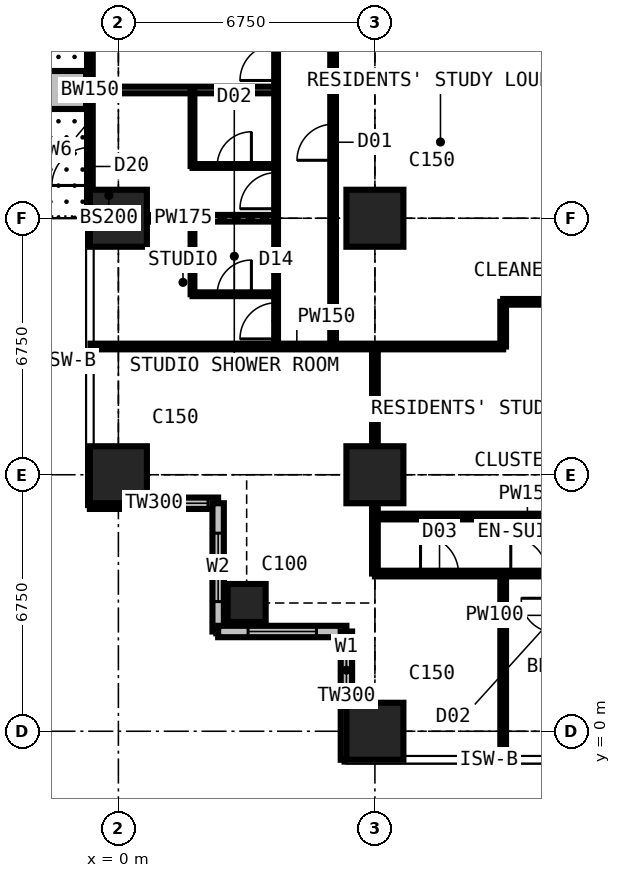
"""IFC4 building model, lengths in metres.
Left out: names, types, materials, properties, quantities, classifications, styles, units other than length and angle.
Written with IfcOpenShell. Run it as: python <this file> out.ifc"""

import sys

from ifc_helpers import new_model, si_unit, direction, frame, frame_2d, origin, origin_2d, place, context, subcontext, project, spatial, rectangle, extrude, element, fill, save


model = new_model("IFC4")
c1 = context("Model", 3, precision=1e-05, world=origin(), true_north=direction((0.0, 1.0)))
c2 = subcontext(c1, "Body", "Model", "MODEL_VIEW")
j1 = project(units=[si_unit("LENGTHUNIT", "METRE"), si_unit("PLANEANGLEUNIT", "RADIAN")], contexts=[c1])
p1 = place(None, origin())
s1 = spatial("IfcSite", under=j1, at=p1, CompositionType="ELEMENT")
p2 = place(p1, origin())
s2 = spatial("IfcBuilding", under=s1, at=p2, CompositionType="ELEMENT")
p3 = place(p2, frame((0.0, 0.0, 130.5)))
s3 = spatial("IfcBuildingStorey", under=s2, at=p3, CompositionType="ELEMENT", Elevation=130.5)
for number, where, z_axis, x_axis in (
    (1, (0.0, 6.75, 0.0), (0.0, 0.0, 1.0), (1.0, 0.0, 0.0)),
    (2, (0.0, 13.5, 0.0), (0.0, 0.0, 1.0), (1.0, 0.0, 0.0)),
):
    element("IfcColumn", number, at=place(p3, frame(where, z_axis=z_axis, x_axis=x_axis)), inside=s3, PredefinedType="COLUMN", context=c2, shape_type="SweptSolid", body=[
        extrude(rectangle(XDim=1.5, YDim=1.5, at=origin_2d()), origin(), (0.0, 0.0, 1.0), 3.6),
    ])
p4 = place(p3, frame((3.375, 3.375, 0.0), z_axis=(0.0, 0.0, 1.0), x_axis=(1.0, 0.0, 0.0)))
e3 = element("IfcColumn", 3, at=p4, inside=s3, PredefinedType="COLUMN", context=c2, shape_type="SweptSolid", body=[
    extrude(rectangle(XDim=1.0, YDim=1.0, at=origin_2d()), origin(), (0.0, 0.0, 1.0), 3.6),
])
for number, where, z_axis, x_axis in (
    (4, (6.75, 0.0, 0.0), (0.0, 0.0, 1.0), (1.0, 0.0, 0.0)),
    (5, (6.75, 6.75, 0.0), (0.0, 0.0, 1.0), (1.0, 0.0, 0.0)),
    (6, (6.75, 13.5, 0.0), (0.0, 0.0, 1.0), (1.0, 0.0, 0.0)),
):
    element("IfcColumn", number, at=place(p3, frame(where, z_axis=z_axis, x_axis=x_axis)), inside=s3, PredefinedType="COLUMN", context=c2, shape_type="SweptSolid", body=[
        extrude(rectangle(XDim=1.5, YDim=1.5, at=origin_2d()), origin(), (0.0, 0.0, 1.0), 3.6),
    ])
p5 = place(p3, frame((-0.75, 13.5, 0.0), z_axis=(0.0, 0.0, 1.0), x_axis=(0.0, 1.0, 0.0)))
e7 = element("IfcWall", 7, at=p5, inside=s3, PredefinedType="SOLIDWALL", context=c2, shape_type="SweptSolid", body=[
    extrude(rectangle(XDim=6.75, YDim=0.15, at=frame_2d((3.375, 0.0))), origin(), (0.0, 0.0, 1.0), 3.375),
])
p6 = place(p5, frame((0.863, 0.0, 0.0)))
e8 = element("IfcOpeningElement", 8, at=p6, cuts=e7, PredefinedType="OPENING", context=c2, shape_type="SweptSolid", body=[
    extrude(rectangle(XDim=1.0, YDim=2.2, at=frame_2d((0.5, 1.1))), frame((0.0, 0.085, 0.0), z_axis=(0.0, -1.0, 0.0), x_axis=(1.0, 0.0, 0.0)), (0.0, 0.0, 1.0), 0.17),
])
p7 = place(p5, frame((1.975, 0.0, 0.9)))
e9 = element("IfcOpeningElement", 9, at=p7, cuts=e7, PredefinedType="OPENING", context=c2, shape_type="SweptSolid", body=[
    extrude(rectangle(XDim=1.2, YDim=1.8, at=frame_2d((0.6, 0.9))), frame((0.0, 0.085, 0.0), z_axis=(0.0, -1.0, 0.0), x_axis=(1.0, 0.0, 0.0)), (0.0, 0.0, 1.0), 0.17),
])
p8 = place(p5, frame((4.887, 0.0, 0.0)))
e10 = element("IfcOpeningElement", 10, at=p8, cuts=e7, PredefinedType="OPENING", context=c2, shape_type="SweptSolid", body=[
    extrude(rectangle(XDim=1.0, YDim=2.2, at=frame_2d((0.5, 1.1))), frame((0.0, 0.085, 0.0), z_axis=(0.0, -1.0, 0.0), x_axis=(1.0, 0.0, 0.0)), (0.0, 0.0, 1.0), 0.17),
])
p9 = place(p5, frame((3.575, 0.0, 0.9)))
e11 = element("IfcOpeningElement", 11, at=p9, cuts=e7, PredefinedType="OPENING", context=c2, shape_type="SweptSolid", body=[
    extrude(rectangle(XDim=1.2, YDim=1.8, at=frame_2d((0.6, 0.9))), frame((0.0, 0.085, 0.0), z_axis=(0.0, -1.0, 0.0), x_axis=(1.0, 0.0, 0.0)), (0.0, 0.0, 1.0), 0.17),
])
p10 = place(p3, frame((-0.75, 6.0, 0.0), z_axis=(0.0, 0.0, 1.0), x_axis=(1.0, 0.0, 0.0)))
e12 = element("IfcWall", 12, at=p10, inside=s3, PredefinedType="SOLIDWALL", context=c2, shape_type="SweptSolid", body=[
    extrude(rectangle(XDim=3.375, YDim=0.3, at=frame_2d((1.688, 0.0))), origin(), (0.0, 0.0, 1.0), 3.375),
])
p11 = place(p10, frame((1.607, 0.0, 0.9)))
e13 = element("IfcOpeningElement", 13, at=p11, cuts=e12, PredefinedType="OPENING", context=c2, shape_type="SweptSolid", body=[
    extrude(rectangle(XDim=1.5, YDim=1.8, at=frame_2d((0.75, 0.9))), frame((0.0, 0.16, 0.0), z_axis=(0.0, -1.0, 0.0), x_axis=(1.0, 0.0, 0.0)), (0.0, 0.0, 1.0), 0.32),
])
p12 = place(p3, frame((2.625, 6.0, 0.0), z_axis=(0.0, 0.0, 1.0), x_axis=(0.0, -1.0, 0.0)))
e14 = element("IfcWall", 14, at=p12, inside=s3, PredefinedType="SOLIDWALL", context=c2, shape_type="SweptSolid", body=[
    extrude(rectangle(XDim=3.375, YDim=0.3, at=frame_2d((1.688, 0.0))), origin(), (0.0, 0.0, 1.0), 3.375),
])
p13 = place(p12, frame((0.788, 0.0, 0.6)))
e15 = element("IfcOpeningElement", 15, at=p13, cuts=e14, PredefinedType="OPENING", context=c2, shape_type="SweptSolid", body=[
    extrude(rectangle(XDim=1.8, YDim=2.1, at=frame_2d((0.9, 1.05))), frame((0.0, 0.16, 0.0), z_axis=(0.0, -1.0, 0.0), x_axis=(1.0, 0.0, 0.0)), (0.0, 0.0, 1.0), 0.32),
])
p14 = place(p3, frame((2.625, 2.625, 0.0), z_axis=(0.0, 0.0, 1.0), x_axis=(1.0, 0.0, 0.0)))
e16 = element("IfcWall", 16, at=p14, inside=s3, PredefinedType="SOLIDWALL", context=c2, shape_type="SweptSolid", body=[
    extrude(rectangle(XDim=3.375, YDim=0.3, at=frame_2d((1.688, 0.0))), origin(), (0.0, 0.0, 1.0), 3.375),
])
p15 = place(p14, frame((0.788, 0.0, 0.6)))
e17 = element("IfcOpeningElement", 17, at=p15, cuts=e16, PredefinedType="OPENING", context=c2, shape_type="SweptSolid", body=[
    extrude(rectangle(XDim=1.8, YDim=2.1, at=frame_2d((0.9, 1.05))), frame((0.0, 0.16, 0.0), z_axis=(0.0, -1.0, 0.0), x_axis=(1.0, 0.0, 0.0)), (0.0, 0.0, 1.0), 0.32),
])
p16 = place(p3, frame((6.0, 2.625, 0.0), z_axis=(0.0, 0.0, 1.0), x_axis=(0.0, -1.0, 0.0)))
e18 = element("IfcWall", 18, at=p16, inside=s3, PredefinedType="SOLIDWALL", context=c2, shape_type="SweptSolid", body=[
    extrude(rectangle(XDim=3.375, YDim=0.3, at=frame_2d((1.688, 0.0))), origin(), (0.0, 0.0, 1.0), 3.375),
])
p17 = place(p16, frame((0.268, 0.0, 0.9)))
e19 = element("IfcOpeningElement", 19, at=p17, cuts=e18, PredefinedType="OPENING", context=c2, shape_type="SweptSolid", body=[
    extrude(rectangle(XDim=1.5, YDim=1.8, at=frame_2d((0.75, 0.9))), frame((0.0, 0.16, 0.0), z_axis=(0.0, -1.0, 0.0), x_axis=(1.0, 0.0, 0.0)), (0.0, 0.0, 1.0), 0.32),
])
p18 = place(p3, frame((-0.85, 16.875, 0.0), z_axis=(0.0, 0.0, 1.0), x_axis=(-1.0, 0.0, 0.0)))
e20 = element("IfcWall", 20, at=p18, inside=s3, PredefinedType="USERDEFINED", context=c2, shape_type="SweptSolid", body=[
    extrude(rectangle(XDim=2.2, YDim=1.0, at=frame_2d((1.1, 0.0))), origin(), (0.0, 0.0, 1.0), 0.9),
])
p19 = place(p3, frame((-0.734, 10.125, 0.0), z_axis=(0.0, 0.0, 1.0), x_axis=(1.0, 0.0, 0.0)))
e21 = element("IfcWall", 21, at=p19, inside=s3, PredefinedType="PARTITIONING", context=c2, shape_type="SweptSolid", body=[
    extrude(rectangle(XDim=10.859, YDim=0.15, at=frame_2d((5.429, 0.0))), origin(), (0.0, 0.0, 1.0), 3.375),
])
p20 = place(p3, frame((-0.734, 13.5, 0.0), z_axis=(0.0, 0.0, 1.0), x_axis=(1.0, 0.0, 0.0)))
e22 = element("IfcWall", 22, at=p20, inside=s3, PredefinedType="PARTITIONING", context=c2, shape_type="SweptSolid", body=[
    extrude(rectangle(XDim=4.884, YDim=0.175, at=frame_2d((2.442, 0.0))), origin(), (0.0, 0.0, 1.0), 2.877),
])
p21 = place(p3, frame((-0.734, 16.875, 0.0), z_axis=(0.0, 0.0, 1.0), x_axis=(1.0, 0.0, 0.0)))
e23 = element("IfcWall", 23, at=p21, inside=s3, PredefinedType="PARTITIONING", context=c2, shape_type="SweptSolid", body=[
    extrude(rectangle(XDim=4.884, YDim=0.175, at=frame_2d((2.442, 0.0))), origin(), (0.0, 0.0, 1.0), 3.375),
])
p22 = place(p3, frame((1.95, 11.5, 0.0), z_axis=(0.0, 0.0, 1.0), x_axis=(0.0, 1.0, 0.0)))
e24 = element("IfcWall", 24, at=p22, inside=s3, PredefinedType="PARTITIONING", context=c2, shape_type="SweptSolid", body=[
    extrude(rectangle(XDim=2.0, YDim=0.1, at=frame_2d((1.0, 0.0))), origin(), (0.0, 0.0, 1.0), 3.375),
])
p23 = place(p3, frame((1.95, 11.5, 0.0), z_axis=(0.0, 0.0, 1.0), x_axis=(1.0, 0.0, 0.0)))
e25 = element("IfcWall", 25, at=p23, inside=s3, PredefinedType="PARTITIONING", context=c2, shape_type="SweptSolid", body=[
    extrude(rectangle(XDim=2.2, YDim=0.1, at=frame_2d((1.1, 0.0))), origin(), (0.0, 0.0, 1.0), 3.375),
])
p24 = place(p23, frame((0.65, 0.0, 0.0)))
e26 = element("IfcOpeningElement", 26, at=p24, cuts=e25, PredefinedType="OPENING", context=c2, shape_type="SweptSolid", body=[
    extrude(rectangle(XDim=0.9, YDim=2.2, at=frame_2d((0.45, 1.1))), frame((0.0, 0.06, 0.0), z_axis=(0.0, -1.0, 0.0), x_axis=(1.0, 0.0, 0.0)), (0.0, 0.0, 1.0), 0.12),
])
p25 = place(p3, frame((1.95, 14.875, 0.0), z_axis=(0.0, 0.0, 1.0), x_axis=(0.0, 1.0, 0.0)))
e27 = element("IfcWall", 27, at=p25, inside=s3, PredefinedType="PARTITIONING", context=c2, shape_type="SweptSolid", body=[
    extrude(rectangle(XDim=2.0, YDim=0.1, at=frame_2d((1.0, 0.0))), origin(), (0.0, 0.0, 1.0), 3.375),
])
p26 = place(p3, frame((1.95, 14.875, 0.0), z_axis=(0.0, 0.0, 1.0), x_axis=(1.0, 0.0, 0.0)))
e28 = element("IfcWall", 28, at=p26, inside=s3, PredefinedType="PARTITIONING", context=c2, shape_type="SweptSolid", body=[
    extrude(rectangle(XDim=2.2, YDim=0.1, at=frame_2d((1.1, 0.0))), origin(), (0.0, 0.0, 1.0), 3.375),
])
p27 = place(p26, frame((0.65, 0.0, 0.0)))
e29 = element("IfcOpeningElement", 29, at=p27, cuts=e28, PredefinedType="OPENING", context=c2, shape_type="SweptSolid", body=[
    extrude(rectangle(XDim=0.9, YDim=2.2, at=frame_2d((0.45, 1.1))), frame((0.0, 0.06, 0.0), z_axis=(0.0, -1.0, 0.0), x_axis=(1.0, 0.0, 0.0)), (0.0, 0.0, 1.0), 0.12),
])
p28 = place(p3, frame((4.15, 10.125, 0.0), z_axis=(0.0, 0.0, 1.0), x_axis=(0.0, 1.0, 0.0)))
e30 = element("IfcWall", 30, at=p28, inside=s3, PredefinedType="PARTITIONING", context=c2, shape_type="SweptSolid", body=[
    extrude(rectangle(XDim=16.875, YDim=0.1, at=frame_2d((8.438, 0.0))), origin(), (0.0, 0.0, 1.0), 3.375),
])
p29 = place(p28, frame((0.2, 0.0, 0.0)))
e31 = element("IfcOpeningElement", 31, at=p29, cuts=e30, PredefinedType="OPENING", context=c2, shape_type="SweptSolid", body=[
    extrude(rectangle(XDim=0.95, YDim=2.2, at=frame_2d((0.475, 1.1))), frame((0.0, 0.06, 0.0), z_axis=(0.0, -1.0, 0.0), x_axis=(1.0, 0.0, 0.0)), (0.0, 0.0, 1.0), 0.12),
])
p30 = place(p28, frame((3.625, 0.0, 0.0)))
e32 = element("IfcOpeningElement", 32, at=p30, cuts=e30, PredefinedType="OPENING", context=c2, shape_type="SweptSolid", body=[
    extrude(rectangle(XDim=0.95, YDim=2.2, at=frame_2d((0.475, 1.1))), frame((0.0, 0.06, 0.0), z_axis=(0.0, -1.0, 0.0), x_axis=(1.0, 0.0, 0.0)), (0.0, 0.0, 1.0), 0.12),
])
p31 = place(p28, frame((7.0, 0.0, 0.0)))
e33 = element("IfcOpeningElement", 33, at=p31, cuts=e30, PredefinedType="OPENING", context=c2, shape_type="SweptSolid", body=[
    extrude(rectangle(XDim=0.95, YDim=2.2, at=frame_2d((0.475, 1.1))), frame((0.0, 0.06, 0.0), z_axis=(0.0, -1.0, 0.0), x_axis=(1.0, 0.0, 0.0)), (0.0, 0.0, 1.0), 0.12),
])
p32 = place(p28, frame((10.375, 0.0, 0.0)))
e34 = element("IfcOpeningElement", 34, at=p32, cuts=e30, PredefinedType="OPENING", context=c2, shape_type="SweptSolid", body=[
    extrude(rectangle(XDim=0.95, YDim=2.2, at=frame_2d((0.475, 1.1))), frame((0.0, 0.06, 0.0), z_axis=(0.0, -1.0, 0.0), x_axis=(1.0, 0.0, 0.0)), (0.0, 0.0, 1.0), 0.12),
])
p33 = place(p3, frame((5.65, 10.125, 0.0), z_axis=(0.0, 0.0, 1.0), x_axis=(0.0, 1.0, 0.0)))
e35 = element("IfcWall", 35, at=p33, inside=s3, PredefinedType="PARTITIONING", context=c2, shape_type="SweptSolid", body=[
    extrude(rectangle(XDim=10.762, YDim=0.15, at=frame_2d((5.381, 0.0))), origin(), (0.0, 0.0, 1.0), 3.375),
])
p34 = place(p33, frame((4.9, 0.0, 0.0)))
e36 = element("IfcOpeningElement", 36, at=p34, cuts=e35, PredefinedType="OPENING", context=c2, shape_type="SweptSolid", body=[
    extrude(rectangle(XDim=0.95, YDim=2.2, at=frame_2d((0.475, 1.1))), frame((0.0, 0.085, 0.0), z_axis=(0.0, -1.0, 0.0), x_axis=(1.0, 0.0, 0.0)), (0.0, 0.0, 1.0), 0.17),
])
p35 = place(p3, frame((6.75, 4.15, 0.0), z_axis=(0.0, 0.0, 1.0), x_axis=(0.0, 1.0, 0.0)))
e37 = element("IfcWall", 37, at=p35, inside=s3, PredefinedType="PARTITIONING", context=c2, shape_type="SweptSolid", body=[
    extrude(rectangle(XDim=5.975, YDim=0.15, at=frame_2d((2.988, 0.0))), origin(), (0.0, 0.0, 1.0), 2.877),
])
p36 = place(p3, frame((6.75, 4.15, 0.0), z_axis=(0.0, 0.0, 1.0), x_axis=(1.0, 0.0, 0.0)))
e38 = element("IfcWall", 38, at=p36, inside=s3, PredefinedType="PARTITIONING", context=c2, shape_type="SweptSolid", body=[
    extrude(rectangle(XDim=23.625, YDim=0.15, at=frame_2d((11.812, 0.0))), origin(), (0.0, 0.0, 1.0), 3.375),
])
p37 = place(p36, frame((1.2, 0.0, 0.0)))
e39 = element("IfcOpeningElement", 39, at=p37, cuts=e38, PredefinedType="OPENING", context=c2, shape_type="SweptSolid", body=[
    extrude(rectangle(XDim=1.0, YDim=2.2, at=frame_2d((0.5, 1.1))), frame((0.0, 0.085, 0.0), z_axis=(0.0, -1.0, 0.0), x_axis=(1.0, 0.0, 0.0)), (0.0, 0.0, 1.0), 0.17),
])
p38 = place(p36, frame((3.575, 0.0, 0.0)))
e40 = element("IfcOpeningElement", 40, at=p38, cuts=e38, PredefinedType="OPENING", context=c2, shape_type="SweptSolid", body=[
    extrude(rectangle(XDim=0.95, YDim=2.2, at=frame_2d((0.475, 1.1))), frame((0.0, 0.085, 0.0), z_axis=(0.0, -1.0, 0.0), x_axis=(1.0, 0.0, 0.0)), (0.0, 0.0, 1.0), 0.17),
])
p39 = place(p36, frame((7.0, 0.0, 0.0)))
e41 = element("IfcOpeningElement", 41, at=p39, cuts=e38, PredefinedType="OPENING", context=c2, shape_type="SweptSolid", body=[
    extrude(rectangle(XDim=0.95, YDim=2.2, at=frame_2d((0.475, 1.1))), frame((0.0, 0.085, 0.0), z_axis=(0.0, -1.0, 0.0), x_axis=(1.0, 0.0, 0.0)), (0.0, 0.0, 1.0), 0.17),
])
p40 = place(p36, frame((18.475, 0.0, 0.0)))
e42 = element("IfcOpeningElement", 42, at=p40, cuts=e38, PredefinedType="OPENING", context=c2, shape_type="SweptSolid", body=[
    extrude(rectangle(XDim=0.95, YDim=2.2, at=frame_2d((0.475, 1.1))), frame((0.0, 0.085, 0.0), z_axis=(0.0, -1.0, 0.0), x_axis=(1.0, 0.0, 0.0)), (0.0, 0.0, 1.0), 0.17),
])
p41 = place(p36, frame((11.725, 0.0, 0.0)))
e43 = element("IfcOpeningElement", 43, at=p41, cuts=e38, PredefinedType="OPENING", context=c2, shape_type="SweptSolid", body=[
    extrude(rectangle(XDim=0.95, YDim=2.2, at=frame_2d((0.475, 1.1))), frame((0.0, 0.085, 0.0), z_axis=(0.0, -1.0, 0.0), x_axis=(1.0, 0.0, 0.0)), (0.0, 0.0, 1.0), 0.17),
])
p42 = place(p3, frame((6.75, 5.65, 0.0), z_axis=(0.0, 0.0, 1.0), x_axis=(1.0, 0.0, 0.0)))
e44 = element("IfcWall", 44, at=p42, inside=s3, PredefinedType="PARTITIONING", context=c2, shape_type="SweptSolid", body=[
    extrude(rectangle(XDim=8.025, YDim=0.15, at=frame_2d((4.012, 0.0))), origin(), (0.0, 0.0, 1.0), 3.375),
])
p43 = place(p3, frame((10.125, -0.734, 0.0), z_axis=(0.0, 0.0, 1.0), x_axis=(0.0, 1.0, 0.0)))
e45 = element("IfcWall", 45, at=p43, inside=s3, PredefinedType="PARTITIONING", context=c2, shape_type="SweptSolid", body=[
    extrude(rectangle(XDim=4.884, YDim=0.15, at=frame_2d((2.442, 0.0))), origin(), (0.0, 0.0, 1.0), 3.375),
])
p44 = place(p3, frame((10.125, 10.125, 0.0), z_axis=(0.0, 0.0, 1.0), x_axis=(0.0, 1.0, 0.0)))
e46 = element("IfcWall", 46, at=p44, inside=s3, PredefinedType="PARTITIONING", context=c2, shape_type="SweptSolid", body=[
    extrude(rectangle(XDim=1.175, YDim=0.15, at=frame_2d((0.587, 0.0))), origin(), (0.0, 0.0, 1.0), 3.375),
])
p45 = place(p3, frame((10.125, 11.3, 0.0), z_axis=(0.0, 0.0, 1.0), x_axis=(1.0, 0.0, 0.0)))
e47 = element("IfcWall", 47, at=p45, inside=s3, PredefinedType="PARTITIONING", context=c2, shape_type="SweptSolid", body=[
    extrude(rectangle(XDim=20.675, YDim=0.15, at=frame_2d((10.337, 0.0))), origin(), (0.0, 0.0, 1.0), 3.375),
])
p46 = place(p45, frame((5.2, 0.0, 0.0)))
e48 = element("IfcOpeningElement", 48, at=p46, cuts=e47, PredefinedType="OPENING", context=c2, shape_type="SweptSolid", body=[
    extrude(rectangle(XDim=1.0, YDim=2.2, at=frame_2d((0.5, 1.1))), frame((0.0, 0.085, 0.0), z_axis=(0.0, -1.0, 0.0), x_axis=(1.0, 0.0, 0.0)), (0.0, 0.0, 1.0), 0.17),
])
p47 = place(p45, frame((11.312, 0.0, 0.0)))
e49 = element("IfcOpeningElement", 49, at=p47, cuts=e47, PredefinedType="OPENING", context=c2, shape_type="SweptSolid", body=[
    extrude(rectangle(XDim=1.0, YDim=2.2, at=frame_2d((0.5, 1.1))), frame((0.0, 0.085, 0.0), z_axis=(0.0, -1.0, 0.0), x_axis=(1.0, 0.0, 0.0)), (0.0, 0.0, 1.0), 0.17),
])
p48 = place(p45, frame((3.225, 0.0, 0.0)))
e50 = element("IfcOpeningElement", 50, at=p48, cuts=e47, PredefinedType="OPENING", context=c2, shape_type="SweptSolid", body=[
    extrude(rectangle(XDim=0.95, YDim=2.2, at=frame_2d((0.475, 1.1))), frame((0.0, 0.085, 0.0), z_axis=(0.0, -1.0, 0.0), x_axis=(1.0, 0.0, 0.0)), (0.0, 0.0, 1.0), 0.17),
])
p49 = place(p6, origin())
e51 = element("IfcDoor", 51, at=p49, inside=s3, OperationType="SINGLE_SWING_LEFT", PredefinedType="DOOR", context=c2, shape_type="SweptSolid", body=[
    extrude(rectangle(XDim=1.0, YDim=2.2, at=frame_2d((0.5, 1.1))), frame((0.0, 0.025, 0.0), z_axis=(0.0, -1.0, 0.0), x_axis=(1.0, 0.0, 0.0)), (0.0, 0.0, 1.0), 0.05),
])
fill(e8, e51)
p50 = place(p7, origin())
e52 = element("IfcWindow", 52, at=p50, inside=s3, PartitioningType="SINGLE_PANEL", PredefinedType="WINDOW", context=c2, shape_type="SweptSolid", body=[
    extrude(rectangle(XDim=1.2, YDim=1.8, at=frame_2d((0.6, 0.9))), frame((0.0, 0.03, 0.0), z_axis=(0.0, -1.0, 0.0), x_axis=(1.0, 0.0, 0.0)), (0.0, 0.0, 1.0), 0.06),
])
fill(e9, e52)
p51 = place(p9, origin())
e53 = element("IfcWindow", 53, at=p51, inside=s3, PartitioningType="SINGLE_PANEL", PredefinedType="WINDOW", context=c2, shape_type="SweptSolid", body=[
    extrude(rectangle(XDim=1.2, YDim=1.8, at=frame_2d((0.6, 0.9))), frame((0.0, 0.03, 0.0), z_axis=(0.0, -1.0, 0.0), x_axis=(1.0, 0.0, 0.0)), (0.0, 0.0, 1.0), 0.06),
])
fill(e11, e53)
p52 = place(p11, origin())
e54 = element("IfcWindow", 54, at=p52, inside=s3, PartitioningType="SINGLE_PANEL", PredefinedType="WINDOW", context=c2, shape_type="SweptSolid", body=[
    extrude(rectangle(XDim=1.5, YDim=1.8, at=frame_2d((0.75, 0.9))), frame((0.0, 0.03, 0.0), z_axis=(0.0, -1.0, 0.0), x_axis=(1.0, 0.0, 0.0)), (0.0, 0.0, 1.0), 0.06),
])
fill(e13, e54)
p53 = place(p13, origin())
e55 = element("IfcWindow", 55, at=p53, inside=s3, PartitioningType="SINGLE_PANEL", PredefinedType="WINDOW", context=c2, shape_type="SweptSolid", body=[
    extrude(rectangle(XDim=1.8, YDim=2.1, at=frame_2d((0.9, 1.05))), frame((0.0, 0.03, 0.0), z_axis=(0.0, -1.0, 0.0), x_axis=(1.0, 0.0, 0.0)), (0.0, 0.0, 1.0), 0.06),
])
fill(e15, e55)
p54 = place(p15, origin())
e56 = element("IfcWindow", 56, at=p54, inside=s3, PartitioningType="SINGLE_PANEL", PredefinedType="WINDOW", context=c2, shape_type="SweptSolid", body=[
    extrude(rectangle(XDim=1.8, YDim=2.1, at=frame_2d((0.9, 1.05))), frame((0.0, 0.03, 0.0), z_axis=(0.0, -1.0, 0.0), x_axis=(1.0, 0.0, 0.0)), (0.0, 0.0, 1.0), 0.06),
])
fill(e17, e56)
p55 = place(p17, origin())
e57 = element("IfcWindow", 57, at=p55, inside=s3, PartitioningType="SINGLE_PANEL", PredefinedType="WINDOW", context=c2, shape_type="SweptSolid", body=[
    extrude(rectangle(XDim=1.5, YDim=1.8, at=frame_2d((0.75, 0.9))), frame((0.0, 0.03, 0.0), z_axis=(0.0, -1.0, 0.0), x_axis=(1.0, 0.0, 0.0)), (0.0, 0.0, 1.0), 0.06),
])
fill(e19, e57)
p56 = place(p37, origin())
e58 = element("IfcDoor", 58, at=p56, inside=s3, OperationType="SINGLE_SWING_LEFT", PredefinedType="DOOR", context=c2, shape_type="SweptSolid", body=[
    extrude(rectangle(XDim=1.0, YDim=2.2, at=frame_2d((0.5, 1.1))), frame((0.0, 0.025, 0.0), z_axis=(0.0, -1.0, 0.0), x_axis=(1.0, 0.0, 0.0)), (0.0, 0.0, 1.0), 0.05),
])
fill(e39, e58)
p57 = place(p38, origin())
e59 = element("IfcDoor", 59, at=p57, inside=s3, OperationType="SINGLE_SWING_LEFT", PredefinedType="DOOR", context=c2, shape_type="SweptSolid", body=[
    extrude(rectangle(XDim=0.95, YDim=2.2, at=frame_2d((0.475, 1.1))), frame((0.0, 0.025, 0.0), z_axis=(0.0, -1.0, 0.0), x_axis=(1.0, 0.0, 0.0)), (0.0, 0.0, 1.0), 0.05),
])
fill(e40, e59)
p58 = place(p29, origin())
e60 = element("IfcDoor", 60, at=p58, inside=s3, OperationType="SINGLE_SWING_LEFT", PredefinedType="DOOR", context=c2, shape_type="SweptSolid", body=[
    extrude(rectangle(XDim=0.95, YDim=2.2, at=frame_2d((0.475, 1.1))), frame((0.0, 0.025, 0.0), z_axis=(0.0, -1.0, 0.0), x_axis=(1.0, 0.0, 0.0)), (0.0, 0.0, 1.0), 0.05),
])
fill(e31, e60)
p59 = place(p24, origin())
e61 = element("IfcDoor", 61, at=p59, inside=s3, OperationType="SINGLE_SWING_RIGHT", PredefinedType="DOOR", context=c2, shape_type="SweptSolid", body=[
    extrude(rectangle(XDim=0.9, YDim=2.2, at=frame_2d((0.45, 1.1))), frame((0.0, 0.025, 0.0), z_axis=(0.0, -1.0, 0.0), x_axis=(1.0, 0.0, 0.0)), (0.0, 0.0, 1.0), 0.05),
])
fill(e26, e61)
p60 = place(p30, origin())
e62 = element("IfcDoor", 62, at=p60, inside=s3, OperationType="SINGLE_SWING_LEFT", PredefinedType="DOOR", context=c2, shape_type="SweptSolid", body=[
    extrude(rectangle(XDim=0.95, YDim=2.2, at=frame_2d((0.475, 1.1))), frame((0.0, 0.025, 0.0), z_axis=(0.0, -1.0, 0.0), x_axis=(1.0, 0.0, 0.0)), (0.0, 0.0, 1.0), 0.05),
])
fill(e32, e62)
p61 = place(p27, origin())
e63 = element("IfcDoor", 63, at=p61, inside=s3, OperationType="SINGLE_SWING_RIGHT", PredefinedType="DOOR", context=c2, shape_type="SweptSolid", body=[
    extrude(rectangle(XDim=0.9, YDim=2.2, at=frame_2d((0.45, 1.1))), frame((0.0, 0.025, 0.0), z_axis=(0.0, -1.0, 0.0), x_axis=(1.0, 0.0, 0.0)), (0.0, 0.0, 1.0), 0.05),
])
fill(e29, e63)
p62 = place(p31, origin())
e64 = element("IfcDoor", 64, at=p62, inside=s3, OperationType="SINGLE_SWING_LEFT", PredefinedType="DOOR", context=c2, shape_type="SweptSolid", body=[
    extrude(rectangle(XDim=0.95, YDim=2.2, at=frame_2d((0.475, 1.1))), frame((0.0, 0.025, 0.0), z_axis=(0.0, -1.0, 0.0), x_axis=(1.0, 0.0, 0.0)), (0.0, 0.0, 1.0), 0.05),
])
fill(e33, e64)
p63 = place(p34, origin())
e65 = element("IfcDoor", 65, at=p63, inside=s3, OperationType="SINGLE_SWING_LEFT", PredefinedType="DOOR", context=c2, shape_type="SweptSolid", body=[
    extrude(rectangle(XDim=0.95, YDim=2.2, at=frame_2d((0.475, 1.1))), frame((0.0, 0.025, 0.0), z_axis=(0.0, -1.0, 0.0), x_axis=(1.0, 0.0, 0.0)), (0.0, 0.0, 1.0), 0.05),
])
fill(e36, e65)
save(model, sys.argv[1])
